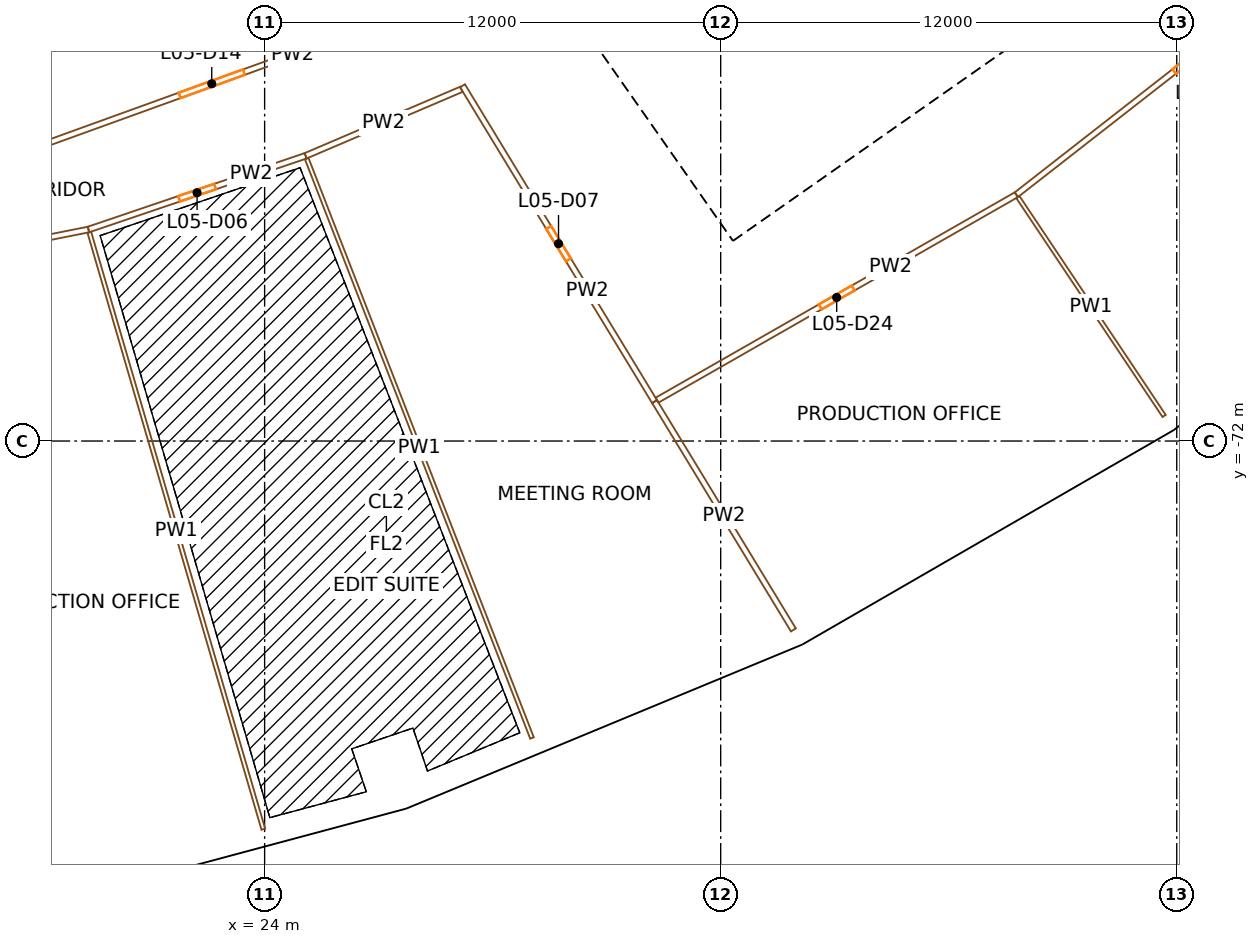
"""IFC4 building model, lengths in metres.
Left out: names, types, materials, properties, quantities, classifications, styles, units other than length and angle.
Written with IfcOpenShell. Run it as: python <this file> out.ifc"""

import sys

from ifc_helpers import new_model, si_unit, direction, frame, frame_2d, origin, origin_2d, place, context, subcontext, project, spatial, rectangle, extrude, element, fill, save


model = new_model("IFC4")
c1 = context("Model", 3, precision=1e-05, world=origin(), true_north=direction((0.0, 1.0)))
c2 = subcontext(c1, "Body", "Model", "MODEL_VIEW")
j1 = project(units=[si_unit("LENGTHUNIT", "METRE"), si_unit("PLANEANGLEUNIT", "RADIAN")], contexts=[c1])
p1 = place(None, origin())
s1 = spatial("IfcSite", under=j1, at=p1, CompositionType="ELEMENT")
p2 = place(p1, origin())
s2 = spatial("IfcBuilding", under=s1, at=p2, CompositionType="ELEMENT")
p3 = place(p2, frame((0.0, 0.0, 36.0)))
s3 = spatial("IfcBuildingStorey", under=s2, at=p3, CompositionType="ELEMENT", Elevation=36.0)
p4 = place(p3, frame((24.992, -73.624, 0.0), z_axis=(0.0, 0.0, 1.0), x_axis=(0.946930129495, 0.321439465303, 0.0)))
e1 = element("IfcColumn", 1, at=p4, inside=s3, PredefinedType="COLUMN", context=c2, shape_type="SweptSolid", body=[
    extrude(rectangle(XDim=1.4, YDim=1.8, at=origin_2d()), origin(), (0.0, 0.0, 1.0), 4.5),
])
p5 = place(p3, frame((27.403, -80.726, 0.0), z_axis=(0.0, 0.0, 1.0), x_axis=(0.946930129495, 0.321439465303, 0.0)))
e2 = element("IfcColumn", 2, at=p5, inside=s3, PredefinedType="COLUMN", context=c2, shape_type="SweptSolid", body=[
    extrude(rectangle(XDim=1.1, YDim=1.3, at=origin_2d()), origin(), (0.0, 0.0, 1.0), 4.5),
])
p6 = place(p3, frame((34.388, -69.732, 0.0), z_axis=(0.0, 0.0, 1.0), x_axis=(0.896872741533, 0.442288690219, 0.0)))
e3 = element("IfcColumn", 3, at=p6, inside=s3, PredefinedType="COLUMN", context=c2, shape_type="SweptSolid", body=[
    extrude(rectangle(XDim=1.4, YDim=1.8, at=origin_2d()), origin(), (0.0, 0.0, 1.0), 4.5),
])
p7 = place(p3, frame((37.705, -76.458, 0.0), z_axis=(0.0, 0.0, 1.0), x_axis=(0.896872741533, 0.442288690219, 0.0)))
e4 = element("IfcColumn", 4, at=p7, inside=s3, PredefinedType="COLUMN", context=c2, shape_type="SweptSolid", body=[
    extrude(rectangle(XDim=1.1, YDim=1.3, at=origin_2d()), origin(), (0.0, 0.0, 1.0), 4.5),
])
p8 = place(p3, frame((43.196, -64.647, 0.0), z_axis=(0.0, 0.0, 1.0), x_axis=(0.831469612303, 0.55557023302, 0.0)))
e5 = element("IfcColumn", 5, at=p8, inside=s3, PredefinedType="COLUMN", context=c2, shape_type="SweptSolid", body=[
    extrude(rectangle(XDim=1.4, YDim=1.8, at=origin_2d()), origin(), (0.0, 0.0, 1.0), 4.5),
])
p9 = place(p3, frame((47.362, -70.883, 0.0), z_axis=(0.0, 0.0, 1.0), x_axis=(0.831469612303, 0.55557023302, 0.0)))
e6 = element("IfcColumn", 6, at=p9, inside=s3, PredefinedType="COLUMN", context=c2, shape_type="SweptSolid", body=[
    extrude(rectangle(XDim=1.1, YDim=1.3, at=origin_2d()), origin(), (0.0, 0.0, 1.0), 4.5),
])
p10 = place(p3, frame((36.717, -66.337, 0.0), z_axis=(0.0, 0.0, 1.0), x_axis=(-0.573577477574, 0.819151315216, 0.0)))
e7 = element("IfcWall", 7, at=p10, inside=s3, PredefinedType="SHEAR", context=c2, shape_type="SweptSolid", body=[
    extrude(rectangle(XDim=14.8, YDim=0.9, at=frame_2d((7.4, 0.0))), origin(), (0.0, 0.0, 1.0), 4.2),
])
p11 = place(p10, frame((6.2, 0.0, 0.0)))
e8 = element("IfcOpeningElement", 8, at=p11, cuts=e7, PredefinedType="OPENING", context=c2, shape_type="SweptSolid", body=[
    extrude(rectangle(XDim=2.4, YDim=2.1, at=frame_2d((1.2, 1.05))), frame((0.0, 0.46, 0.0), z_axis=(0.0, -1.0, 0.0), x_axis=(1.0, 0.0, 0.0)), (0.0, 0.0, 1.0), 0.92),
])
p12 = place(p3, frame((36.827, -65.71, 0.0), z_axis=(0.0, 0.0, 1.0), x_axis=(0.819153391756, 0.573574511963, 0.0)))
e9 = element("IfcWall", 9, at=p12, inside=s3, PredefinedType="SHEAR", context=c2, shape_type="SweptSolid", body=[
    extrude(rectangle(XDim=15.045, YDim=0.9, at=frame_2d((7.523, 0.0))), origin(), (0.0, 0.0, 1.0), 4.2),
])
p13 = place(p12, frame((0.6, 0.0, 0.0)))
e10 = element("IfcOpeningElement", 10, at=p13, cuts=e9, PredefinedType="OPENING", context=c2, shape_type="SweptSolid", body=[
    extrude(rectangle(XDim=1.0, YDim=2.1, at=frame_2d((0.5, 1.05))), frame((0.0, 0.46, 0.0), z_axis=(0.0, -1.0, 0.0), x_axis=(1.0, 0.0, 0.0)), (0.0, 0.0, 1.0), 0.92),
])
p14 = place(p12, frame((3.275, 0.0, 0.0)))
e11 = element("IfcOpeningElement", 11, at=p14, cuts=e9, PredefinedType="OPENING", context=c2, shape_type="SweptSolid", body=[
    extrude(rectangle(XDim=1.0, YDim=2.1, at=frame_2d((0.5, 1.05))), frame((0.0, 0.46, 0.0), z_axis=(0.0, -1.0, 0.0), x_axis=(1.0, 0.0, 0.0)), (0.0, 0.0, 1.0), 0.92),
])
p15 = place(p12, frame((6.175, 0.0, 0.0)))
e12 = element("IfcOpeningElement", 12, at=p15, cuts=e9, PredefinedType="OPENING", context=c2, shape_type="SweptSolid", body=[
    extrude(rectangle(XDim=1.0, YDim=2.1, at=frame_2d((0.5, 1.05))), frame((0.0, 0.46, 0.0), z_axis=(0.0, -1.0, 0.0), x_axis=(1.0, 0.0, 0.0)), (0.0, 0.0, 1.0), 0.92),
])
p16 = place(p12, frame((13.495, 0.0, 0.0)))
e13 = element("IfcOpeningElement", 13, at=p16, cuts=e9, PredefinedType="OPENING", context=c2, shape_type="SweptSolid", body=[
    extrude(rectangle(XDim=1.1, YDim=2.1, at=frame_2d((0.55, 1.05))), frame((0.0, 0.46, 0.0), z_axis=(0.0, -1.0, 0.0), x_axis=(1.0, 0.0, 0.0)), (0.0, 0.0, 1.0), 0.92),
])
p17 = place(p3, frame((35.221, -63.417, 0.0), z_axis=(0.0, 0.0, 1.0), x_axis=(0.819166993208, 0.573555086491, 0.0)))
e14 = element("IfcWall", 14, at=p17, inside=s3, PredefinedType="SOLIDWALL", context=c2, shape_type="SweptSolid", body=[
    extrude(rectangle(XDim=7.95, YDim=0.3, at=frame_2d((3.975, 0.0))), origin(), (0.0, 0.0, 1.0), 4.2),
])
for number, where, z_axis, x_axis in (
    (15, (37.15, -62.249, 0.0), (0.0, 0.0, 1.0), (0.574, -0.819, 0.0)),
    (16, (39.649, -60.5, 0.0), (0.0, 0.0, 1.0), (0.574, -0.819, 0.0)),
):
    element("IfcWall", number, at=place(p3, frame(where, z_axis=z_axis, x_axis=x_axis)), inside=s3, PredefinedType="PLUMBINGWALL", context=c2, shape_type="SweptSolid", body=[
        extrude(rectangle(XDim=2.2, YDim=0.1, at=frame_2d((1.1, 0.0))), origin(), (0.0, 0.0, 1.0), 4.2),
    ])
p18 = place(p3, frame((16.754, -84.379, 0.0), z_axis=(0.0, 0.0, 1.0), x_axis=(0.965923678926, 0.258827059038, 0.0)))
e17 = element("IfcWall", 17, at=p18, inside=s3, PredefinedType="SOLIDWALL", context=c2, shape_type="SweptSolid", body=[
    extrude(rectangle(XDim=11.312, YDim=0.45, at=frame_2d((5.656, 0.0))), origin(), (0.0, 0.0, 1.0), 3.2),
])
p19 = place(p18, frame((4.006, 0.0, 0.9)))
e18 = element("IfcOpeningElement", 18, at=p19, cuts=e17, PredefinedType="OPENING", context=c2, shape_type="SweptSolid", body=[
    extrude(rectangle(XDim=1.2, YDim=2.15, at=frame_2d((0.6, 1.075))), frame((0.0, 0.235, 0.0), z_axis=(0.0, -1.0, 0.0), x_axis=(1.0, 0.0, 0.0)), (0.0, 0.0, 1.0), 0.47),
])
p20 = place(p18, frame((6.106, 0.0, 0.9)))
e19 = element("IfcOpeningElement", 19, at=p20, cuts=e17, PredefinedType="OPENING", context=c2, shape_type="SweptSolid", body=[
    extrude(rectangle(XDim=1.2, YDim=2.15, at=frame_2d((0.6, 1.075))), frame((0.0, 0.235, 0.0), z_axis=(0.0, -1.0, 0.0), x_axis=(1.0, 0.0, 0.0)), (0.0, 0.0, 1.0), 0.47),
])
p21 = place(p3, frame((27.706, -81.437, 0.0), z_axis=(0.0, 0.0, 1.0), x_axis=(0.923874126662, 0.382696482978, 0.0)))
e20 = element("IfcWall", 20, at=p21, inside=s3, PredefinedType="SOLIDWALL", context=c2, shape_type="SweptSolid", body=[
    extrude(rectangle(XDim=11.135, YDim=0.45, at=frame_2d((5.567, 0.0))), origin(), (0.0, 0.0, 1.0), 3.2),
])
p22 = place(p21, frame((3.917, 0.0, 0.9)))
e21 = element("IfcOpeningElement", 21, at=p22, cuts=e20, PredefinedType="OPENING", context=c2, shape_type="SweptSolid", body=[
    extrude(rectangle(XDim=1.2, YDim=2.15, at=frame_2d((0.6, 1.075))), frame((0.0, 0.235, 0.0), z_axis=(0.0, -1.0, 0.0), x_axis=(1.0, 0.0, 0.0)), (0.0, 0.0, 1.0), 0.47),
])
p23 = place(p21, frame((6.017, 0.0, 0.9)))
e22 = element("IfcOpeningElement", 22, at=p23, cuts=e20, PredefinedType="OPENING", context=c2, shape_type="SweptSolid", body=[
    extrude(rectangle(XDim=1.2, YDim=2.15, at=frame_2d((0.6, 1.075))), frame((0.0, 0.235, 0.0), z_axis=(0.0, -1.0, 0.0), x_axis=(1.0, 0.0, 0.0)), (0.0, 0.0, 1.0), 0.47),
])
p24 = place(p3, frame((38.022, -77.168, 0.0), z_axis=(0.0, 0.0, 1.0), x_axis=(0.866024577697, 0.500001430823, 0.0)))
e23 = element("IfcWall", 23, at=p24, inside=s3, PredefinedType="SOLIDWALL", context=c2, shape_type="SweptSolid", body=[
    extrude(rectangle(XDim=11.312, YDim=0.45, at=frame_2d((5.656, 0.0))), origin(), (0.0, 0.0, 1.0), 3.2),
])
p25 = place(p24, frame((4.006, 0.0, 0.9)))
e24 = element("IfcOpeningElement", 24, at=p25, cuts=e23, PredefinedType="OPENING", context=c2, shape_type="SweptSolid", body=[
    extrude(rectangle(XDim=1.2, YDim=2.15, at=frame_2d((0.6, 1.075))), frame((0.0, 0.235, 0.0), z_axis=(0.0, -1.0, 0.0), x_axis=(1.0, 0.0, 0.0)), (0.0, 0.0, 1.0), 0.47),
])
p26 = place(p24, frame((6.106, 0.0, 0.9)))
e25 = element("IfcOpeningElement", 25, at=p26, cuts=e23, PredefinedType="OPENING", context=c2, shape_type="SweptSolid", body=[
    extrude(rectangle(XDim=1.2, YDim=2.15, at=frame_2d((0.6, 1.075))), frame((0.0, 0.235, 0.0), z_axis=(0.0, -1.0, 0.0), x_axis=(1.0, 0.0, 0.0)), (0.0, 0.0, 1.0), 0.47),
])
p27 = place(p3, frame((47.839, -71.491, 0.0), z_axis=(0.0, 0.0, 1.0), x_axis=(0.793355377778, 0.608758773695, 0.0)))
e26 = element("IfcWall", 26, at=p27, inside=s3, PredefinedType="SOLIDWALL", context=c2, shape_type="SweptSolid", body=[
    extrude(rectangle(XDim=11.135, YDim=0.45, at=frame_2d((5.567, 0.0))), origin(), (0.0, 0.0, 1.0), 3.2),
])
p28 = place(p27, frame((3.917, 0.0, 0.9)))
e27 = element("IfcOpeningElement", 27, at=p28, cuts=e26, PredefinedType="OPENING", context=c2, shape_type="SweptSolid", body=[
    extrude(rectangle(XDim=1.2, YDim=2.15, at=frame_2d((0.6, 1.075))), frame((0.0, 0.235, 0.0), z_axis=(0.0, -1.0, 0.0), x_axis=(1.0, 0.0, 0.0)), (0.0, 0.0, 1.0), 0.47),
])
p29 = place(p27, frame((6.017, 0.0, 0.9)))
e28 = element("IfcOpeningElement", 28, at=p29, cuts=e26, PredefinedType="OPENING", context=c2, shape_type="SweptSolid", body=[
    extrude(rectangle(XDim=1.2, YDim=2.15, at=frame_2d((0.6, 1.075))), frame((0.0, 0.235, 0.0), z_axis=(0.0, -1.0, 0.0), x_axis=(1.0, 0.0, 0.0)), (0.0, 0.0, 1.0), 0.47),
])
p30 = place(p3, frame((19.366, -66.435, 0.0), z_axis=(0.0, 0.0, 1.0), x_axis=(-0.980784812657, -0.195092673522, 0.0)))
e29 = element("IfcWall", 29, at=p30, inside=s3, PredefinedType="PARTITIONING", context=c2, shape_type="SweptSolid", body=[
    extrude(rectangle(XDim=12.066, YDim=0.15, at=frame_2d((6.033, 0.0))), origin(), (0.0, 0.0, 1.0), 3.1),
])
p31 = place(p30, frame((5.133, 0.0, 0.0)))
e30 = element("IfcOpeningElement", 30, at=p31, cuts=e29, PredefinedType="OPENING", context=c2, shape_type="SweptSolid", body=[
    extrude(rectangle(XDim=1.8, YDim=2.1, at=frame_2d((0.9, 1.05))), frame((0.0, 0.085, 0.0), z_axis=(0.0, -1.0, 0.0), x_axis=(1.0, 0.0, 0.0)), (0.0, 0.0, 1.0), 0.17),
])
p32 = place(p3, frame((17.297, -64.521, 0.0), z_axis=(0.0, 0.0, 1.0), x_axis=(0.940366959124, 0.340161700061, 0.0)))
e31 = element("IfcWall", 31, at=p32, inside=s3, PredefinedType="PARTITIONING", context=c2, shape_type="SweptSolid", body=[
    extrude(rectangle(XDim=11.296, YDim=0.15, at=frame_2d((5.648, 0.0))), origin(), (0.0, 0.0, 1.0), 3.1),
])
p33 = place(p32, frame((4.748, 0.0, 0.0)))
e32 = element("IfcOpeningElement", 32, at=p33, cuts=e31, PredefinedType="OPENING", context=c2, shape_type="SweptSolid", body=[
    extrude(rectangle(XDim=1.8, YDim=2.1, at=frame_2d((0.9, 1.05))), frame((0.0, 0.085, 0.0), z_axis=(0.0, -1.0, 0.0), x_axis=(1.0, 0.0, 0.0)), (0.0, 0.0, 1.0), 0.17),
])
p34 = place(p3, frame((25.079, -64.496, 0.0), z_axis=(0.0, 0.0, 1.0), x_axis=(-0.94693295825, -0.321431131939, 0.0)))
e33 = element("IfcWall", 33, at=p34, inside=s3, PredefinedType="PARTITIONING", context=c2, shape_type="SweptSolid", body=[
    extrude(rectangle(XDim=6.033, YDim=0.15, at=frame_2d((3.017, 0.0))), origin(), (0.0, 0.0, 1.0), 3.1),
])
p35 = place(p34, frame((2.517, 0.0, 0.0)))
e34 = element("IfcOpeningElement", 34, at=p35, cuts=e33, PredefinedType="OPENING", context=c2, shape_type="SweptSolid", body=[
    extrude(rectangle(XDim=1.0, YDim=2.1, at=frame_2d((0.5, 1.05))), frame((0.0, 0.085, 0.0), z_axis=(0.0, -1.0, 0.0), x_axis=(1.0, 0.0, 0.0)), (0.0, 0.0, 1.0), 0.17),
])
p36 = place(p3, frame((23.966, -82.214, 0.0), z_axis=(0.0, 0.0, 1.0), x_axis=(-0.279849295153, 0.960043942746, 0.0)))
e35 = element("IfcWall", 35, at=p36, inside=s3, PredefinedType="PARTITIONING", context=c2, shape_type="SweptSolid", body=[
    extrude(rectangle(XDim=16.361, YDim=0.1, at=frame_2d((8.181, 0.0))), origin(), (0.0, 0.0, 1.0), 3.1),
])
p37 = place(p3, frame((25.079, -64.496, 0.0), z_axis=(0.0, 0.0, 1.0), x_axis=(0.91966288709, 0.392708765001, 0.0)))
e36 = element("IfcWall", 36, at=p37, inside=s3, PredefinedType="PARTITIONING", context=c2, shape_type="SweptSolid", body=[
    extrude(rectangle(XDim=4.456, YDim=0.15, at=frame_2d((2.228, 0.0))), origin(), (0.0, 0.0, 1.0), 3.1),
])
p38 = place(p3, frame((34.26, -70.963, 0.0), z_axis=(0.0, 0.0, 1.0), x_axis=(-0.519573423316, 0.854425805897, 0.0)))
e37 = element("IfcWall", 37, at=p38, inside=s3, PredefinedType="PARTITIONING", context=c2, shape_type="SweptSolid", body=[
    extrude(rectangle(XDim=9.726, YDim=0.15, at=frame_2d((4.863, 0.0))), origin(), (0.0, 0.0, 1.0), 3.1),
])
p39 = place(p38, frame((4.363, 0.0, 0.0)))
e38 = element("IfcOpeningElement", 38, at=p39, cuts=e37, PredefinedType="OPENING", context=c2, shape_type="SweptSolid", body=[
    extrude(rectangle(XDim=1.0, YDim=2.1, at=frame_2d((0.5, 1.05))), frame((0.0, 0.085, 0.0), z_axis=(0.0, -1.0, 0.0), x_axis=(1.0, 0.0, 0.0)), (0.0, 0.0, 1.0), 0.17),
])
p40 = place(p3, frame((31.035, -79.814, 0.0), z_axis=(0.0, 0.0, 1.0), x_axis=(-0.362399453939, 0.932022872995, 0.0)))
e39 = element("IfcWall", 39, at=p40, inside=s3, PredefinedType="PARTITIONING", context=c2, shape_type="SweptSolid", body=[
    extrude(rectangle(XDim=16.361, YDim=0.1, at=frame_2d((8.18, 0.0))), origin(), (0.0, 0.0, 1.0), 3.1),
])
p41 = place(p3, frame((34.26, -70.963, 0.0), z_axis=(0.0, 0.0, 1.0), x_axis=(0.519582317334, -0.854420397412, 0.0)))
e40 = element("IfcWall", 40, at=p41, inside=s3, PredefinedType="PARTITIONING", context=c2, shape_type="SweptSolid", body=[
    extrude(rectangle(XDim=7.032, YDim=0.15, at=frame_2d((3.516, 0.0))), origin(), (0.0, 0.0, 1.0), 3.1),
])
p42 = place(p3, frame((43.779, -65.52, 0.0), z_axis=(0.0, 0.0, 1.0), x_axis=(-0.868112049759, -0.496368279671, 0.0)))
e41 = element("IfcWall", 41, at=p42, inside=s3, PredefinedType="PARTITIONING", context=c2, shape_type="SweptSolid", body=[
    extrude(rectangle(XDim=10.89, YDim=0.15, at=frame_2d((5.445, 0.0))), origin(), (0.0, 0.0, 1.0), 3.1),
])
p43 = place(p42, frame((4.945, 0.0, 0.0)))
e42 = element("IfcOpeningElement", 42, at=p43, cuts=e41, PredefinedType="OPENING", context=c2, shape_type="SweptSolid", body=[
    extrude(rectangle(XDim=1.0, YDim=2.1, at=frame_2d((0.5, 1.05))), frame((0.0, 0.085, 0.0), z_axis=(0.0, -1.0, 0.0), x_axis=(1.0, 0.0, 0.0)), (0.0, 0.0, 1.0), 0.17),
])
p44 = place(p3, frame((52.877, -58.418, 0.0), z_axis=(0.0, 0.0, 1.0), x_axis=(-0.788255221118, -0.615348443063, 0.0)))
e43 = element("IfcWall", 43, at=p44, inside=s3, PredefinedType="PARTITIONING", context=c2, shape_type="SweptSolid", body=[
    extrude(rectangle(XDim=11.542, YDim=0.15, at=frame_2d((5.771, 0.0))), origin(), (0.0, 0.0, 1.0), 3.1),
])
p45 = place(p44, frame((5.271, 0.0, 0.0)))
e44 = element("IfcOpeningElement", 44, at=p45, cuts=e43, PredefinedType="OPENING", context=c2, shape_type="SweptSolid", body=[
    extrude(rectangle(XDim=1.0, YDim=2.1, at=frame_2d((0.5, 1.05))), frame((0.0, 0.085, 0.0), z_axis=(0.0, -1.0, 0.0), x_axis=(1.0, 0.0, 0.0)), (0.0, 0.0, 1.0), 0.17),
])
p46 = place(p3, frame((47.668, -71.34, 0.0), z_axis=(0.0, 0.0, 1.0), x_axis=(-0.55558668503, 0.831458619185, 0.0)))
e45 = element("IfcWall", 45, at=p46, inside=s3, PredefinedType="PARTITIONING", context=c2, shape_type="SweptSolid", body=[
    extrude(rectangle(XDim=6.925, YDim=0.1, at=frame_2d((3.462, 0.0))), origin(), (0.0, 0.0, 1.0), 3.1),
])
p47 = place(p13, origin())
e46 = element("IfcDoor", 46, at=p47, inside=s3, OperationType="SINGLE_SWING_RIGHT", PredefinedType="DOOR", context=c2, shape_type="SweptSolid", body=[
    extrude(rectangle(XDim=1.0, YDim=2.1, at=frame_2d((0.5, 1.05))), frame((0.0, 0.025, 0.0), z_axis=(0.0, -1.0, 0.0), x_axis=(1.0, 0.0, 0.0)), (0.0, 0.0, 1.0), 0.05),
])
fill(e10, e46)
p48 = place(p14, origin())
e47 = element("IfcDoor", 47, at=p48, inside=s3, OperationType="SINGLE_SWING_LEFT", PredefinedType="DOOR", context=c2, shape_type="SweptSolid", body=[
    extrude(rectangle(XDim=1.0, YDim=2.1, at=frame_2d((0.5, 1.05))), frame((0.0, 0.025, 0.0), z_axis=(0.0, -1.0, 0.0), x_axis=(1.0, 0.0, 0.0)), (0.0, 0.0, 1.0), 0.05),
])
fill(e11, e47)
p49 = place(p15, origin())
e48 = element("IfcDoor", 48, at=p49, inside=s3, OperationType="SINGLE_SWING_RIGHT", PredefinedType="DOOR", context=c2, shape_type="SweptSolid", body=[
    extrude(rectangle(XDim=1.0, YDim=2.1, at=frame_2d((0.5, 1.05))), frame((0.0, 0.025, 0.0), z_axis=(0.0, -1.0, 0.0), x_axis=(1.0, 0.0, 0.0)), (0.0, 0.0, 1.0), 0.05),
])
fill(e12, e48)
p50 = place(p19, origin())
e49 = element("IfcWindow", 49, at=p50, inside=s3, PartitioningType="SINGLE_PANEL", PredefinedType="WINDOW", context=c2, shape_type="SweptSolid", body=[
    extrude(rectangle(XDim=1.2, YDim=2.15, at=frame_2d((0.6, 1.075))), frame((0.0, 0.03, 0.0), z_axis=(0.0, -1.0, 0.0), x_axis=(1.0, 0.0, 0.0)), (0.0, 0.0, 1.0), 0.06),
])
fill(e18, e49)
p51 = place(p20, origin())
e50 = element("IfcWindow", 50, at=p51, inside=s3, PartitioningType="SINGLE_PANEL", PredefinedType="WINDOW", context=c2, shape_type="SweptSolid", body=[
    extrude(rectangle(XDim=1.2, YDim=2.15, at=frame_2d((0.6, 1.075))), frame((0.0, 0.03, 0.0), z_axis=(0.0, -1.0, 0.0), x_axis=(1.0, 0.0, 0.0)), (0.0, 0.0, 1.0), 0.06),
])
fill(e19, e50)
p52 = place(p22, origin())
e51 = element("IfcWindow", 51, at=p52, inside=s3, PartitioningType="SINGLE_PANEL", PredefinedType="WINDOW", context=c2, shape_type="SweptSolid", body=[
    extrude(rectangle(XDim=1.2, YDim=2.15, at=frame_2d((0.6, 1.075))), frame((0.0, 0.03, 0.0), z_axis=(0.0, -1.0, 0.0), x_axis=(1.0, 0.0, 0.0)), (0.0, 0.0, 1.0), 0.06),
])
fill(e21, e51)
p53 = place(p23, origin())
e52 = element("IfcWindow", 52, at=p53, inside=s3, PartitioningType="SINGLE_PANEL", PredefinedType="WINDOW", context=c2, shape_type="SweptSolid", body=[
    extrude(rectangle(XDim=1.2, YDim=2.15, at=frame_2d((0.6, 1.075))), frame((0.0, 0.03, 0.0), z_axis=(0.0, -1.0, 0.0), x_axis=(1.0, 0.0, 0.0)), (0.0, 0.0, 1.0), 0.06),
])
fill(e22, e52)
p54 = place(p25, origin())
e53 = element("IfcWindow", 53, at=p54, inside=s3, PartitioningType="SINGLE_PANEL", PredefinedType="WINDOW", context=c2, shape_type="SweptSolid", body=[
    extrude(rectangle(XDim=1.2, YDim=2.15, at=frame_2d((0.6, 1.075))), frame((0.0, 0.03, 0.0), z_axis=(0.0, -1.0, 0.0), x_axis=(1.0, 0.0, 0.0)), (0.0, 0.0, 1.0), 0.06),
])
fill(e24, e53)
p55 = place(p26, origin())
e54 = element("IfcWindow", 54, at=p55, inside=s3, PartitioningType="SINGLE_PANEL", PredefinedType="WINDOW", context=c2, shape_type="SweptSolid", body=[
    extrude(rectangle(XDim=1.2, YDim=2.15, at=frame_2d((0.6, 1.075))), frame((0.0, 0.03, 0.0), z_axis=(0.0, -1.0, 0.0), x_axis=(1.0, 0.0, 0.0)), (0.0, 0.0, 1.0), 0.06),
])
fill(e25, e54)
p56 = place(p35, origin())
e55 = element("IfcDoor", 55, at=p56, inside=s3, OperationType="SINGLE_SWING_RIGHT", PredefinedType="DOOR", context=c2, shape_type="SweptSolid", body=[
    extrude(rectangle(XDim=1.0, YDim=2.1, at=frame_2d((0.5, 1.05))), frame((0.0, 0.025, 0.0), z_axis=(0.0, -1.0, 0.0), x_axis=(1.0, 0.0, 0.0)), (0.0, 0.0, 1.0), 0.05),
])
fill(e34, e55)
p57 = place(p39, origin())
e56 = element("IfcDoor", 56, at=p57, inside=s3, OperationType="SINGLE_SWING_RIGHT", PredefinedType="DOOR", context=c2, shape_type="SweptSolid", body=[
    extrude(rectangle(XDim=1.0, YDim=2.1, at=frame_2d((0.5, 1.05))), frame((0.0, 0.025, 0.0), z_axis=(0.0, -1.0, 0.0), x_axis=(1.0, 0.0, 0.0)), (0.0, 0.0, 1.0), 0.05),
])
fill(e38, e56)
p58 = place(p33, origin())
e57 = element("IfcDoor", 57, at=p58, inside=s3, OperationType="DOUBLE_DOOR_SINGLE_SWING", PredefinedType="DOOR", context=c2, shape_type="SweptSolid", body=[
    extrude(rectangle(XDim=1.8, YDim=2.1, at=frame_2d((0.9, 1.05))), frame((0.0, 0.025, 0.0), z_axis=(0.0, -1.0, 0.0), x_axis=(1.0, 0.0, 0.0)), (0.0, 0.0, 1.0), 0.05),
])
fill(e32, e57)
p59 = place(p43, origin())
e58 = element("IfcDoor", 58, at=p59, inside=s3, OperationType="SINGLE_SWING_RIGHT", PredefinedType="DOOR", context=c2, shape_type="SweptSolid", body=[
    extrude(rectangle(XDim=1.0, YDim=2.1, at=frame_2d((0.5, 1.05))), frame((0.0, 0.025, 0.0), z_axis=(0.0, -1.0, 0.0), x_axis=(1.0, 0.0, 0.0)), (0.0, 0.0, 1.0), 0.05),
])
fill(e42, e58)
p60 = place(p45, origin())
e59 = element("IfcDoor", 59, at=p60, inside=s3, OperationType="SINGLE_SWING_RIGHT", PredefinedType="DOOR", context=c2, shape_type="SweptSolid", body=[
    extrude(rectangle(XDim=1.0, YDim=2.1, at=frame_2d((0.5, 1.05))), frame((0.0, 0.025, 0.0), z_axis=(0.0, -1.0, 0.0), x_axis=(1.0, 0.0, 0.0)), (0.0, 0.0, 1.0), 0.05),
])
fill(e44, e59)
save(model, sys.argv[1])
